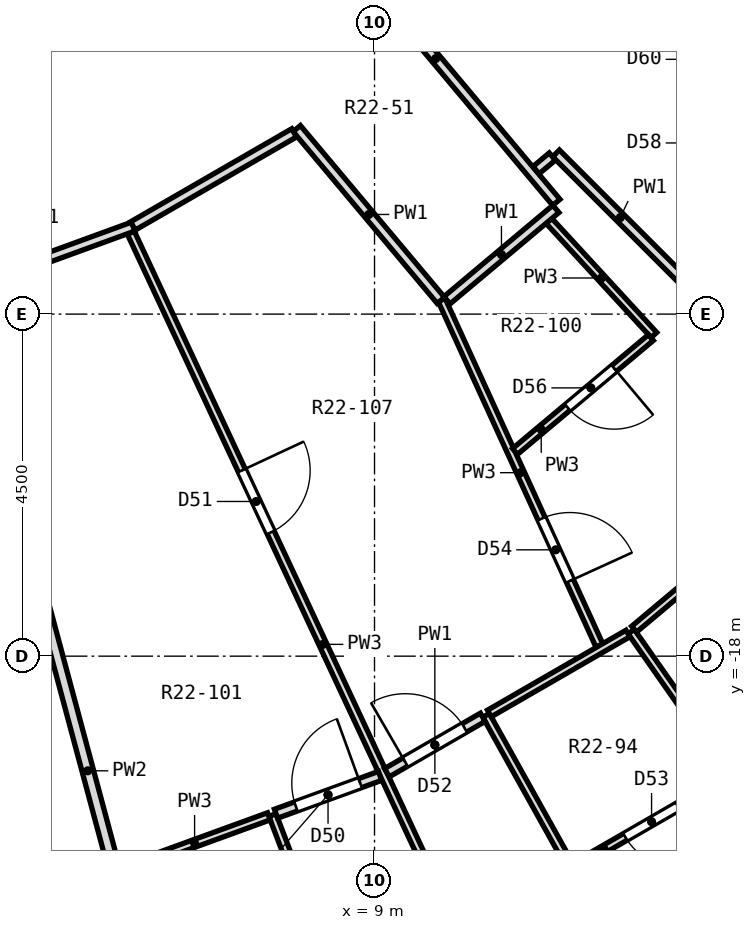
"""IFC4 building model, lengths in metres.
Left out: names, types, materials, properties, quantities, classifications, styles, units other than length and angle.
Written with IfcOpenShell. Run it as: python <this file> out.ifc"""

import sys

from ifc_helpers import new_model, si_unit, direction, frame, frame_2d, origin, place, context, subcontext, project, spatial, rectangle, extrude, element, fill, save


model = new_model("IFC4")
c1 = context("Model", 3, precision=1e-05, world=origin(), true_north=direction((0.0, 1.0)))
c2 = subcontext(c1, "Body", "Model", "MODEL_VIEW")
j1 = project(units=[si_unit("LENGTHUNIT", "METRE"), si_unit("PLANEANGLEUNIT", "RADIAN")], contexts=[c1])
p1 = place(None, origin())
s1 = spatial("IfcSite", under=j1, at=p1, CompositionType="ELEMENT")
p2 = place(p1, origin())
s2 = spatial("IfcBuilding", under=s1, at=p2, CompositionType="ELEMENT")
p3 = place(p2, frame((0.0, 0.0, 141.4)))
s3 = spatial("IfcBuildingStorey", under=s2, at=p3, CompositionType="ELEMENT", Elevation=141.4)
p4 = place(p3, frame((4.288, -16.002, 0.0), z_axis=(0.0, 0.0, 1.0), x_axis=(0.25900000819, -0.965877319207, 0.0)))
e1 = element("IfcWall", 1, at=p4, inside=s3, PredefinedType="PARTITIONING", context=c2, shape_type="SweptSolid", body=[
    extrude(rectangle(XDim=7.259, YDim=0.15, at=frame_2d((3.63, 0.0))), origin(), (0.0, 0.0, 1.0), 2.8),
])
p5 = place(p3, frame((7.657, -20.09, 0.0), z_axis=(0.0, 0.0, 1.0), x_axis=(0.35616749028, -0.934422130981, 0.0)))
e2 = element("IfcWall", 2, at=p5, inside=s3, PredefinedType="PARTITIONING", context=c2, shape_type="SweptSolid", body=[
    extrude(rectangle(XDim=2.3, YDim=0.1, at=frame_2d((1.15, 0.0))), origin(), (0.0, 0.0, 1.0), 2.8),
])
p6 = place(p3, frame((9.883, -13.312, 0.0), z_axis=(0.0, 0.0, 1.0), x_axis=(0.415273903312, -0.909696424764, 0.0)))
e3 = element("IfcWall", 3, at=p6, inside=s3, PredefinedType="PARTITIONING", context=c2, shape_type="SweptSolid", body=[
    extrude(rectangle(XDim=5.0, YDim=0.1, at=frame_2d((2.5, 0.0))), origin(), (0.0, 0.0, 1.0), 2.8),
])
p7 = place(p6, frame((3.166, 0.0, 0.0)))
e4 = element("IfcOpeningElement", 4, at=p7, cuts=e3, PredefinedType="OPENING", context=c2, shape_type="SweptSolid", body=[
    extrude(rectangle(XDim=0.9, YDim=2.1, at=frame_2d((0.45, 1.05))), frame((0.0, 0.062, 0.0), z_axis=(0.0, -1.0, 0.0), x_axis=(1.0, 0.0, 0.0)), (0.0, 0.0, 1.0), 0.124),
])
p8 = place(p3, frame((5.794, -12.43, 0.0), z_axis=(0.0, 0.0, 1.0), x_axis=(0.422795993745, -0.906224888023, 0.0)))
e5 = element("IfcWall", 5, at=p8, inside=s3, PredefinedType="PARTITIONING", context=c2, shape_type="SweptSolid", body=[
    extrude(rectangle(XDim=11.951, YDim=0.1, at=frame_2d((5.975, 0.0))), origin(), (0.0, 0.0, 1.0), 2.8),
])
p9 = place(p8, frame((3.451, 0.0, 0.0)))
e6 = element("IfcOpeningElement", 6, at=p9, cuts=e5, PredefinedType="OPENING", context=c2, shape_type="SweptSolid", body=[
    extrude(rectangle(XDim=0.9, YDim=2.1, at=frame_2d((0.45, 1.05))), frame((0.0, 0.062, 0.0), z_axis=(0.0, -1.0, 0.0), x_axis=(1.0, 0.0, 0.0)), (0.0, 0.0, 1.0), 0.124),
])
p10 = place(p3, frame((10.468, -18.779, 0.0), z_axis=(0.0, 0.0, 1.0), x_axis=(0.486886136125, -0.873465448915, 0.0)))
e7 = element("IfcWall", 7, at=p10, inside=s3, PredefinedType="PARTITIONING", context=c2, shape_type="SweptSolid", body=[
    extrude(rectangle(XDim=2.3, YDim=0.1, at=frame_2d((1.15, 0.0))), origin(), (0.0, 0.0, 1.0), 2.8),
])
p11 = place(p3, frame((12.377, -17.677, 0.0), z_axis=(0.0, 0.0, 1.0), x_axis=(0.573843281236, -0.818965132702, 0.0)))
e8 = element("IfcWall", 8, at=p11, inside=s3, PredefinedType="PARTITIONING", context=c2, shape_type="SweptSolid", body=[
    extrude(rectangle(XDim=4.086, YDim=0.1, at=frame_2d((2.043, 0.0))), origin(), (0.0, 0.0, 1.0), 2.8),
])
p12 = place(p3, frame((7.977, -11.059, 0.0), z_axis=(0.0, 0.0, 1.0), x_axis=(0.642679638204, -0.766135028985, 0.0)))
e9 = element("IfcWall", 9, at=p12, inside=s3, PredefinedType="PARTITIONING", context=c2, shape_type="SweptSolid", body=[
    extrude(rectangle(XDim=2.95, YDim=0.125, at=frame_2d((1.475, 0.0))), origin(), (0.0, 0.0, 1.0), 2.8),
])
p13 = place(p3, frame((8.22, -8.247, 0.0), z_axis=(0.0, 0.0, 1.0), x_axis=(0.642555132876, -0.766239454228, 0.0)))
e10 = element("IfcWall", 10, at=p13, inside=s3, PredefinedType="PARTITIONING", context=c2, shape_type="SweptSolid", body=[
    extrude(rectangle(XDim=4.937, YDim=0.125, at=frame_2d((2.468, 0.0))), origin(), (0.0, 0.0, 1.0), 2.8),
])
p14 = place(p3, frame((11.295, -12.274, 0.0), z_axis=(0.0, 0.0, 1.0), x_axis=(0.676981317167, -0.736000201228, 0.0)))
e11 = element("IfcWall", 11, at=p14, inside=s3, PredefinedType="PARTITIONING", context=c2, shape_type="SweptSolid", body=[
    extrude(rectangle(XDim=2.039, YDim=0.1, at=frame_2d((1.02, 0.0))), origin(), (0.0, 0.0, 1.0), 2.8),
])
p15 = place(p3, frame((11.388, -11.385, 0.0), z_axis=(0.0, 0.0, 1.0), x_axis=(0.707157874563, -0.707055684118, 0.0)))
e12 = element("IfcWall", 12, at=p15, inside=s3, PredefinedType="PARTITIONING", context=c2, shape_type="SweptSolid", body=[
    extrude(rectangle(XDim=2.389, YDim=0.125, at=frame_2d((1.195, 0.0))), origin(), (0.0, 0.0, 1.0), 2.8),
])
p16 = place(p3, frame((5.656, -20.818, 0.0), z_axis=(0.0, 0.0, 1.0), x_axis=(0.939728291625, 0.341922122596, 0.0)))
e13 = element("IfcWall", 13, at=p16, inside=s3, PredefinedType="PARTITIONING", context=c2, shape_type="SweptSolid", body=[
    extrude(rectangle(XDim=2.08, YDim=0.1, at=frame_2d((1.04, 0.0))), origin(), (0.0, 0.0, 1.0), 2.8),
])
p17 = place(p3, frame((7.704, -20.073, 0.0), z_axis=(0.0, 0.0, 1.0), x_axis=(0.939788529673, 0.341756520778, 0.0)))
e14 = element("IfcWall", 14, at=p17, inside=s3, PredefinedType="PARTITIONING", context=c2, shape_type="SweptSolid", body=[
    extrude(rectangle(XDim=1.457, YDim=0.125, at=frame_2d((0.728, 0.0))), origin(), (0.0, 0.0, 1.0), 2.8),
])
p18 = place(p17, frame((0.278, 0.0, 0.0)))
e15 = element("IfcOpeningElement", 15, at=p18, cuts=e14, PredefinedType="OPENING", context=c2, shape_type="SweptSolid", body=[
    extrude(rectangle(XDim=0.9, YDim=2.1, at=frame_2d((0.45, 1.05))), frame((0.0, 0.074, 0.0), z_axis=(0.0, -1.0, 0.0), x_axis=(1.0, 0.0, 0.0)), (0.0, 0.0, 1.0), 0.149),
])
p19 = place(p3, frame((3.409, -13.23, 0.0), z_axis=(0.0, 0.0, 1.0), x_axis=(0.939430059453, 0.34274066493, 0.0)))
e16 = element("IfcWall", 16, at=p19, inside=s3, PredefinedType="PARTITIONING", context=c2, shape_type="SweptSolid", body=[
    extrude(rectangle(XDim=2.573, YDim=0.125, at=frame_2d((1.287, 0.0))), origin(), (0.0, 0.0, 1.0), 2.8),
])
p20 = place(p3, frame((11.631, -20.763, 0.0), z_axis=(0.0, 0.0, 1.0), x_axis=(0.866130014302, 0.499818765479, 0.0)))
e17 = element("IfcWall", 17, at=p20, inside=s3, PredefinedType="PARTITIONING", context=c2, shape_type="SweptSolid", body=[
    extrude(rectangle(XDim=2.341, YDim=0.1, at=frame_2d((1.17, 0.0))), origin(), (0.0, 0.0, 1.0), 2.8),
])
p21 = place(p20, frame((0.771, 0.0, 0.0)))
e18 = element("IfcOpeningElement", 18, at=p21, cuts=e17, PredefinedType="OPENING", context=c2, shape_type="SweptSolid", body=[
    extrude(rectangle(XDim=0.8, YDim=2.1, at=frame_2d((0.4, 1.05))), frame((0.0, 0.062, 0.0), z_axis=(0.0, -1.0, 0.0), x_axis=(1.0, 0.0, 0.0)), (0.0, 0.0, 1.0), 0.124),
])
p22 = place(p3, frame((10.511, -18.754, 0.0), z_axis=(0.0, 0.0, 1.0), x_axis=(0.866071606143, 0.499919966627, 0.0)))
e19 = element("IfcWall", 19, at=p22, inside=s3, PredefinedType="PARTITIONING", context=c2, shape_type="SweptSolid", body=[
    extrude(rectangle(XDim=2.104, YDim=0.1, at=frame_2d((1.052, 0.0))), origin(), (0.0, 0.0, 1.0), 2.8),
])
p23 = place(p3, frame((9.163, -19.533, 0.0), z_axis=(0.0, 0.0, 1.0), x_axis=(0.865819905352, 0.500355764928, 0.0)))
e20 = element("IfcWall", 20, at=p23, inside=s3, PredefinedType="PARTITIONING", context=c2, shape_type="SweptSolid", body=[
    extrude(rectangle(XDim=1.457, YDim=0.125, at=frame_2d((0.729, 0.0))), origin(), (0.0, 0.0, 1.0), 2.8),
])
p24 = place(p23, frame((0.279, 0.0, 0.0)))
e21 = element("IfcOpeningElement", 21, at=p24, cuts=e20, PredefinedType="OPENING", context=c2, shape_type="SweptSolid", body=[
    extrude(rectangle(XDim=0.9, YDim=2.1, at=frame_2d((0.45, 1.05))), frame((0.0, 0.074, 0.0), z_axis=(0.0, -1.0, 0.0), x_axis=(1.0, 0.0, 0.0)), (0.0, 0.0, 1.0), 0.149),
])
p25 = place(p3, frame((5.822, -12.34, 0.0), z_axis=(0.0, 0.0, 1.0), x_axis=(0.865951440693, 0.500128085955, 0.0)))
e22 = element("IfcWall", 22, at=p25, inside=s3, PredefinedType="PARTITIONING", context=c2, shape_type="SweptSolid", body=[
    extrude(rectangle(XDim=2.448, YDim=0.125, at=frame_2d((1.224, 0.0))), origin(), (0.0, 0.0, 1.0), 2.8),
])
p26 = place(p3, frame((11.125, -11.606, 0.0), z_axis=(0.0, 0.0, 1.0), x_axis=(0.766857755144, 0.641817094955, 0.0)))
e23 = element("IfcWall", 23, at=p26, inside=s3, PredefinedType="PARTITIONING", context=c2, shape_type="SweptSolid", body=[
    extrude(rectangle(XDim=0.279, YDim=0.125, at=frame_2d((0.14, 0.0))), origin(), (0.0, 0.0, 1.0), 2.8),
])
p27 = place(p3, frame((12.415, -17.645, 0.0), z_axis=(0.0, 0.0, 1.0), x_axis=(0.766093039246, 0.642729690631, 0.0)))
e24 = element("IfcWall", 24, at=p27, inside=s3, PredefinedType="PARTITIONING", context=c2, shape_type="SweptSolid", body=[
    extrude(rectangle(XDim=2.205, YDim=0.1, at=frame_2d((1.102, 0.0))), origin(), (0.0, 0.0, 1.0), 2.8),
])
p28 = place(p3, frame((10.848, -15.307, 0.0), z_axis=(0.0, 0.0, 1.0), x_axis=(0.766356114298, 0.642415991456, 0.0)))
e25 = element("IfcWall", 25, at=p28, inside=s3, PredefinedType="PARTITIONING", context=c2, shape_type="SweptSolid", body=[
    extrude(rectangle(XDim=2.332, YDim=0.1, at=frame_2d((1.166, 0.0))), origin(), (0.0, 0.0, 1.0), 2.8),
])
p29 = place(p28, frame((0.902, 0.0, 0.0)))
e26 = element("IfcOpeningElement", 26, at=p29, cuts=e25, PredefinedType="OPENING", context=c2, shape_type="SweptSolid", body=[
    extrude(rectangle(XDim=0.8, YDim=2.1, at=frame_2d((0.4, 1.05))), frame((0.0, 0.062, 0.0), z_axis=(0.0, -1.0, 0.0), x_axis=(1.0, 0.0, 0.0)), (0.0, 0.0, 1.0), 0.124),
])
p30 = place(p3, frame((9.954, -13.317, 0.0), z_axis=(0.0, 0.0, 1.0), x_axis=(0.766162509907, 0.642646876919, 0.0)))
e27 = element("IfcWall", 27, at=p30, inside=s3, PredefinedType="PARTITIONING", context=c2, shape_type="SweptSolid", body=[
    extrude(rectangle(XDim=1.87, YDim=0.125, at=frame_2d((0.935, 0.0))), origin(), (0.0, 0.0, 1.0), 2.8),
])
p31 = place(p18, origin())
e28 = element("IfcDoor", 28, at=p31, inside=s3, OperationType="SINGLE_SWING_RIGHT", PredefinedType="DOOR", context=c2, shape_type="SweptSolid", body=[
    extrude(rectangle(XDim=0.9, YDim=2.1, at=frame_2d((0.45, 1.05))), frame((0.0, 0.025, 0.0), z_axis=(0.0, -1.0, 0.0), x_axis=(1.0, 0.0, 0.0)), (0.0, 0.0, 1.0), 0.05),
])
fill(e15, e28)
p32 = place(p9, origin())
e29 = element("IfcDoor", 29, at=p32, inside=s3, OperationType="SINGLE_SWING_LEFT", PredefinedType="DOOR", context=c2, shape_type="SweptSolid", body=[
    extrude(rectangle(XDim=0.9, YDim=2.1, at=frame_2d((0.45, 1.05))), frame((0.0, 0.025, 0.0), z_axis=(0.0, -1.0, 0.0), x_axis=(1.0, 0.0, 0.0)), (0.0, 0.0, 1.0), 0.05),
])
fill(e6, e29)
p33 = place(p24, origin())
e30 = element("IfcDoor", 30, at=p33, inside=s3, OperationType="SINGLE_SWING_LEFT", PredefinedType="DOOR", context=c2, shape_type="SweptSolid", body=[
    extrude(rectangle(XDim=0.9, YDim=2.1, at=frame_2d((0.45, 1.05))), frame((0.0, 0.025, 0.0), z_axis=(0.0, -1.0, 0.0), x_axis=(1.0, 0.0, 0.0)), (0.0, 0.0, 1.0), 0.05),
])
fill(e21, e30)
p34 = place(p21, frame((0.8, 0.0, 0.0), z_axis=(0.0, 0.0, 1.0), x_axis=(-1.0, 0.0, 0.0)))
e31 = element("IfcDoor", 31, at=p34, inside=s3, OperationType="SINGLE_SWING_LEFT", PredefinedType="DOOR", context=c2, shape_type="SweptSolid", body=[
    extrude(rectangle(XDim=0.8, YDim=2.1, at=frame_2d((0.4, 1.05))), frame((0.0, 0.025, 0.0), z_axis=(0.0, -1.0, 0.0), x_axis=(1.0, 0.0, 0.0)), (0.0, 0.0, 1.0), 0.05),
])
fill(e18, e31)
p35 = place(p7, origin())
e32 = element("IfcDoor", 32, at=p35, inside=s3, OperationType="SINGLE_SWING_RIGHT", PredefinedType="DOOR", context=c2, shape_type="SweptSolid", body=[
    extrude(rectangle(XDim=0.9, YDim=2.1, at=frame_2d((0.45, 1.05))), frame((0.0, 0.025, 0.0), z_axis=(0.0, -1.0, 0.0), x_axis=(1.0, 0.0, 0.0)), (0.0, 0.0, 1.0), 0.05),
])
fill(e4, e32)
p36 = place(p29, frame((0.8, 0.0, 0.0), z_axis=(0.0, 0.0, 1.0), x_axis=(-1.0, 0.0, 0.0)))
e33 = element("IfcDoor", 33, at=p36, inside=s3, OperationType="SINGLE_SWING_LEFT", PredefinedType="DOOR", context=c2, shape_type="SweptSolid", body=[
    extrude(rectangle(XDim=0.8, YDim=2.1, at=frame_2d((0.4, 1.05))), frame((0.0, 0.025, 0.0), z_axis=(0.0, -1.0, 0.0), x_axis=(1.0, 0.0, 0.0)), (0.0, 0.0, 1.0), 0.05),
])
fill(e26, e33)
save(model, sys.argv[1])
